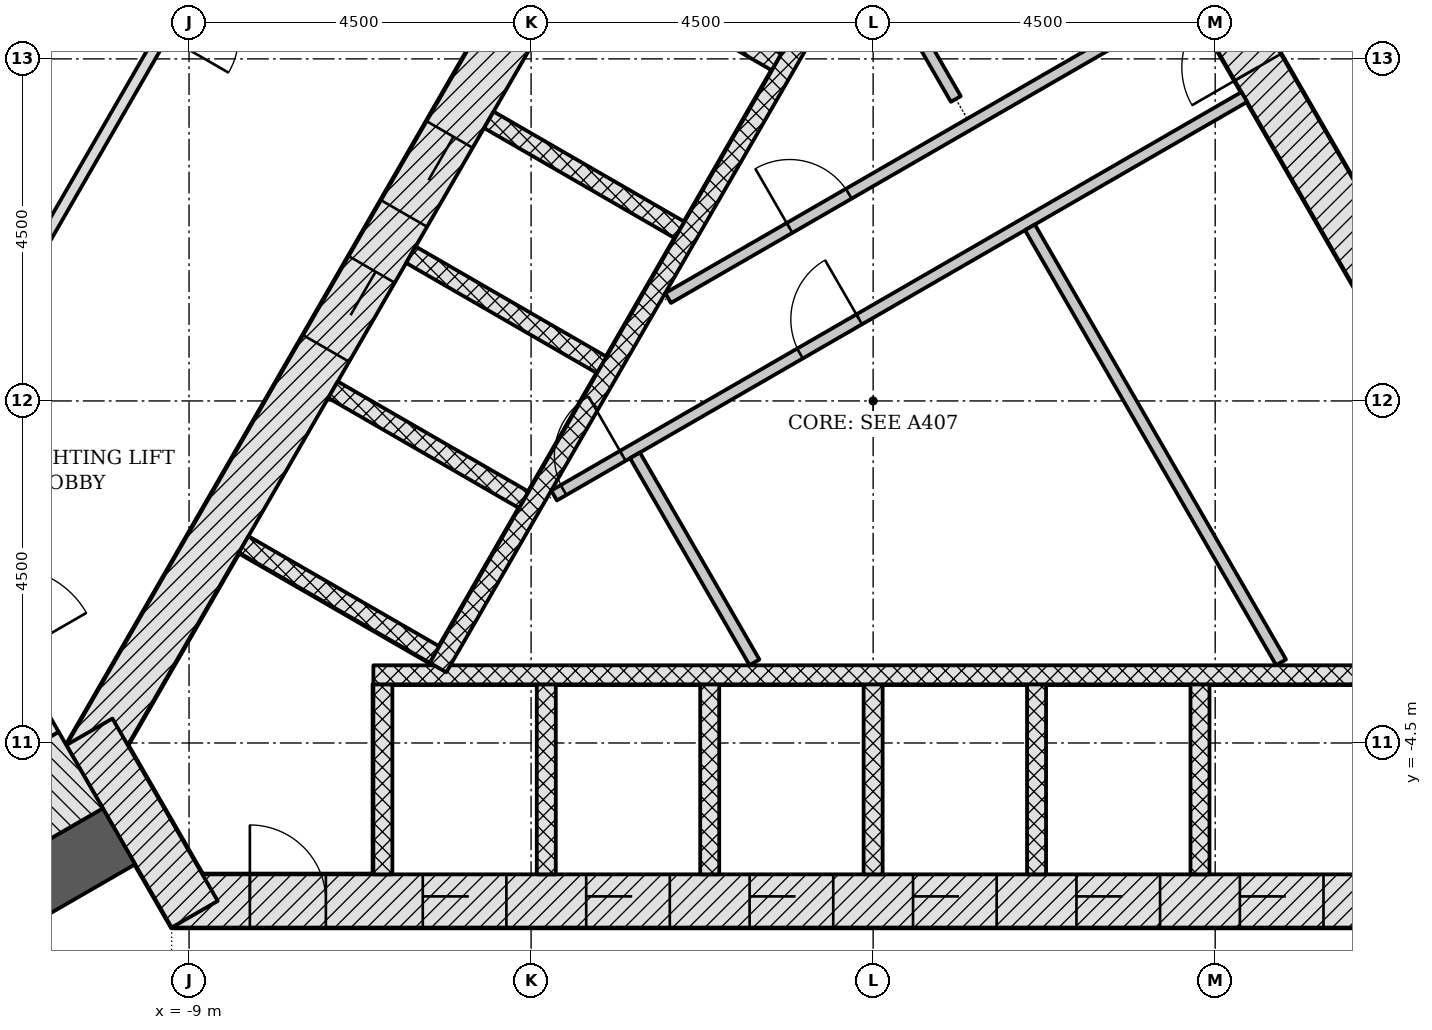
"""IFC4 building model, lengths in metres.
Left out: names, types, materials, properties, quantities, classifications, styles, units other than length and angle.
Written with IfcOpenShell. Run it as: python <this file> out.ifc"""

import sys

from ifc_helpers import new_model, si_unit, direction, frame, frame_2d, origin, place, context, subcontext, project, spatial, rectangle, extrude, element, fill, save


model = new_model("IFC4")
c1 = context("Model", 3, precision=1e-05, world=origin(), true_north=direction((0.0, 1.0)))
c2 = subcontext(c1, "Body", "Model", "MODEL_VIEW")
j1 = project(units=[si_unit("LENGTHUNIT", "METRE"), si_unit("PLANEANGLEUNIT", "RADIAN")], contexts=[c1])
p1 = place(None, origin())
s1 = spatial("IfcSite", under=j1, at=p1, CompositionType="ELEMENT")
p2 = place(p1, origin())
s2 = spatial("IfcBuilding", under=s1, at=p2, CompositionType="ELEMENT")
p3 = place(p2, frame((0.0, 0.0, 45.6)))
s3 = spatial("IfcBuildingStorey", under=s2, at=p3, CompositionType="ELEMENT", Elevation=45.6)
p4 = place(p3, frame((-9.229, -6.578, -0.2), z_axis=(0.0, 0.0, 1.0), x_axis=(1.0, 0.0, 0.0)))
e1 = element("IfcWall", 1, at=p4, inside=s3, PredefinedType="SHEAR", context=c2, shape_type="SweptSolid", body=[
    extrude(rectangle(XDim=18.458, YDim=0.7, at=frame_2d((9.229, 0.0))), origin(), (0.0, 0.0, 1.0), 3.6),
])
p5 = place(p4, frame((3.304, 0.0, 0.2)))
e2 = element("IfcOpeningElement", 2, at=p5, cuts=e1, PredefinedType="OPENING", context=c2, shape_type="SweptSolid", body=[
    extrude(rectangle(XDim=1.1, YDim=2.1, at=frame_2d((0.55, 1.05))), frame((0.0, 0.36, 0.0), z_axis=(0.0, -1.0, 0.0), x_axis=(1.0, 0.0, 0.0)), (0.0, 0.0, 1.0), 0.72),
])
p6 = place(p4, frame((5.454, 0.0, 0.2)))
e3 = element("IfcOpeningElement", 3, at=p6, cuts=e1, PredefinedType="OPENING", context=c2, shape_type="SweptSolid", body=[
    extrude(rectangle(XDim=1.1, YDim=2.1, at=frame_2d((0.55, 1.05))), frame((0.0, 0.36, 0.0), z_axis=(0.0, -1.0, 0.0), x_axis=(1.0, 0.0, 0.0)), (0.0, 0.0, 1.0), 0.72),
])
p7 = place(p4, frame((7.604, 0.0, 0.2)))
e4 = element("IfcOpeningElement", 4, at=p7, cuts=e1, PredefinedType="OPENING", context=c2, shape_type="SweptSolid", body=[
    extrude(rectangle(XDim=1.1, YDim=2.1, at=frame_2d((0.55, 1.05))), frame((0.0, 0.36, 0.0), z_axis=(0.0, -1.0, 0.0), x_axis=(1.0, 0.0, 0.0)), (0.0, 0.0, 1.0), 0.72),
])
p8 = place(p4, frame((9.754, 0.0, 0.2)))
e5 = element("IfcOpeningElement", 5, at=p8, cuts=e1, PredefinedType="OPENING", context=c2, shape_type="SweptSolid", body=[
    extrude(rectangle(XDim=1.1, YDim=2.1, at=frame_2d((0.55, 1.05))), frame((0.0, 0.36, 0.0), z_axis=(0.0, -1.0, 0.0), x_axis=(1.0, 0.0, 0.0)), (0.0, 0.0, 1.0), 0.72),
])
p9 = place(p4, frame((11.904, 0.0, 0.2)))
e6 = element("IfcOpeningElement", 6, at=p9, cuts=e1, PredefinedType="OPENING", context=c2, shape_type="SweptSolid", body=[
    extrude(rectangle(XDim=1.1, YDim=2.1, at=frame_2d((0.55, 1.05))), frame((0.0, 0.36, 0.0), z_axis=(0.0, -1.0, 0.0), x_axis=(1.0, 0.0, 0.0)), (0.0, 0.0, 1.0), 0.72),
])
p10 = place(p4, frame((14.054, 0.0, 0.2)))
e7 = element("IfcOpeningElement", 7, at=p10, cuts=e1, PredefinedType="OPENING", context=c2, shape_type="SweptSolid", body=[
    extrude(rectangle(XDim=1.1, YDim=2.1, at=frame_2d((0.55, 1.05))), frame((0.0, 0.36, 0.0), z_axis=(0.0, -1.0, 0.0), x_axis=(1.0, 0.0, 0.0)), (0.0, 0.0, 1.0), 0.72),
])
p11 = place(p4, frame((1.029, 0.0, 0.2)))
e8 = element("IfcOpeningElement", 8, at=p11, cuts=e1, PredefinedType="OPENING", context=c2, shape_type="SweptSolid", body=[
    extrude(rectangle(XDim=1.0, YDim=2.1, at=frame_2d((0.5, 1.05))), frame((0.0, 0.36, 0.0), z_axis=(0.0, -1.0, 0.0), x_axis=(1.0, 0.0, 0.0)), (0.0, 0.0, 1.0), 0.72),
])
p12 = place(p3, frame((10.311, -4.703, -0.2), z_axis=(0.0, 0.0, 1.0), x_axis=(-0.500001446645, 0.866024568562, 0.0)))
e9 = element("IfcWall", 9, at=p12, inside=s3, PredefinedType="SHEAR", context=c2, shape_type="SweptSolid", body=[
    extrude(rectangle(XDim=18.458, YDim=0.7, at=frame_2d((9.229, 0.0))), origin(), (0.0, 0.0, 1.0), 3.6),
])
p13 = place(p12, frame((10.5, 0.0, 0.2)))
e10 = element("IfcOpeningElement", 10, at=p13, cuts=e9, PredefinedType="OPENING", context=c2, shape_type="SweptSolid", body=[
    extrude(rectangle(XDim=1.0, YDim=2.1, at=frame_2d((0.5, 1.05))), frame((0.0, 0.36, 0.0), z_axis=(0.0, -1.0, 0.0), x_axis=(1.0, 0.0, 0.0)), (0.0, 0.0, 1.0), 0.72),
])
p14 = place(p12, frame((4.877, 0.0, 0.2)))
e11 = element("IfcOpeningElement", 11, at=p14, cuts=e9, PredefinedType="OPENING", context=c2, shape_type="SweptSolid", body=[
    extrude(rectangle(XDim=0.9, YDim=2.1, at=frame_2d((0.45, 1.05))), frame((0.0, 0.36, 0.0), z_axis=(0.0, -1.0, 0.0), x_axis=(1.0, 0.0, 0.0)), (0.0, 0.0, 1.0), 0.72),
])
p15 = place(p12, frame((14.452, 0.0, 0.2)))
e12 = element("IfcOpeningElement", 12, at=p15, cuts=e9, PredefinedType="OPENING", context=c2, shape_type="SweptSolid", body=[
    extrude(rectangle(XDim=0.9, YDim=2.1, at=frame_2d((0.45, 1.05))), frame((0.0, 0.36, 0.0), z_axis=(0.0, -1.0, 0.0), x_axis=(1.0, 0.0, 0.0)), (0.0, 0.0, 1.0), 0.72),
])
p16 = place(p3, frame((-1.083, 11.281, -0.2), z_axis=(0.0, 0.0, 1.0), x_axis=(-0.500001446645, -0.866024568562, 0.0)))
e13 = element("IfcWall", 13, at=p16, inside=s3, PredefinedType="SHEAR", context=c2, shape_type="SweptSolid", body=[
    extrude(rectangle(XDim=18.458, YDim=0.7, at=frame_2d((9.229, 0.0))), origin(), (0.0, 0.0, 1.0), 3.6),
])
p17 = place(p16, frame((8.979, 0.0, 0.2)))
e14 = element("IfcOpeningElement", 14, at=p17, cuts=e13, PredefinedType="OPENING", context=c2, shape_type="SweptSolid", body=[
    extrude(rectangle(XDim=1.2, YDim=2.1, at=frame_2d((0.6, 1.05))), frame((0.0, 0.36, 0.0), z_axis=(0.0, -1.0, 0.0), x_axis=(1.0, 0.0, 0.0)), (0.0, 0.0, 1.0), 0.72),
])
p18 = place(p16, frame((11.029, 0.0, 0.2)))
e15 = element("IfcOpeningElement", 15, at=p18, cuts=e13, PredefinedType="OPENING", context=c2, shape_type="SweptSolid", body=[
    extrude(rectangle(XDim=1.2, YDim=2.1, at=frame_2d((0.6, 1.05))), frame((0.0, 0.36, 0.0), z_axis=(0.0, -1.0, 0.0), x_axis=(1.0, 0.0, 0.0)), (0.0, 0.0, 1.0), 0.72),
])
p19 = place(p3, frame((-10.311, -4.353, -0.2), z_axis=(0.0, 0.0, 1.0), x_axis=(0.500042739161, -0.866000726912, 0.0)))
e16 = element("IfcWall", 16, at=p19, inside=s3, PredefinedType="SHEAR", context=c2, shape_type="SweptSolid", body=[
    extrude(rectangle(XDim=2.771, YDim=0.7, at=frame_2d((1.386, 0.0))), origin(), (0.0, 0.0, 1.0), 3.6),
])
p20 = place(p3, frame((-9.922, -5.728, -0.2), z_axis=(0.0, 0.0, 1.0), x_axis=(-0.866021666006, -0.500006473966, 0.0)))
e17 = element("IfcWall", 17, at=p20, inside=s3, PredefinedType="SHEAR", context=c2, shape_type="SweptSolid", body=[
    extrude(rectangle(XDim=14.013, YDim=0.85, at=frame_2d((7.007, 0.0))), origin(), (0.0, 0.0, 1.0), 3.6),
])
for number, where, z_axis, x_axis in (
    (18, (-6.45, -6.228, -0.2), (0.0, 0.0, 1.0), (0.0, 1.0, 0.0)),
    (19, (-4.3, -6.228, -0.2), (0.0, 0.0, 1.0), (0.0, 1.0, 0.0)),
    (20, (-2.15, -6.228, -0.2), (0.0, 0.0, 1.0), (0.0, 1.0, 0.0)),
    (21, (0.0, -6.228, -0.2), (0.0, 0.0, 1.0), (0.0, 1.0, 0.0)),
    (22, (2.15, -6.228, -0.2), (0.0, 0.0, 1.0), (0.0, 1.0, 0.0)),
    (23, (4.3, -6.228, -0.2), (0.0, 0.0, 1.0), (0.0, 1.0, 0.0)),
):
    element("IfcWall", number, at=place(p3, frame(where, z_axis=z_axis, x_axis=x_axis)), inside=s3, PredefinedType="PARTITIONING", context=c2, shape_type="SweptSolid", body=[
        extrude(rectangle(XDim=2.5, YDim=0.25, at=frame_2d((1.25, 0.0))), origin(), (0.0, 0.0, 1.0), 3.6),
    ])
p21 = place(p3, frame((-6.575, -3.603, 0.0), z_axis=(0.0, 0.0, 1.0), x_axis=(1.0, 0.0, 0.0)))
e24 = element("IfcWall", 24, at=p21, inside=s3, PredefinedType="PARTITIONING", context=c2, shape_type="SweptSolid", body=[
    extrude(rectangle(XDim=13.15, YDim=0.25, at=frame_2d((6.575, 0.0))), origin(), (0.0, 0.0, 1.0), 3.4),
])
for number, where, z_axis, x_axis in (
    (25, (-3.781, 5.907, -0.2), (0.0, 0.0, 1.0), (0.866, -0.5, 0.0)),
    (26, (-5.056, 3.699, -0.2), (0.0, 0.0, 1.0), (0.866, -0.5, 0.0)),
    (27, (-6.081, 1.923, -0.2), (0.0, 0.0, 1.0), (0.866, -0.5, 0.0)),
    (28, (-7.106, 0.148, -0.2), (0.0, 0.0, 1.0), (0.866, -0.5, 0.0)),
    (29, (-8.281, -1.887, -0.2), (0.0, 0.0, 1.0), (0.866, -0.5, 0.0)),
):
    element("IfcWall", number, at=place(p3, frame(where, z_axis=z_axis, x_axis=x_axis)), inside=s3, PredefinedType="PARTITIONING", context=c2, shape_type="SweptSolid", body=[
        extrude(rectangle(XDim=2.9, YDim=0.25, at=frame_2d((1.45, 0.0))), origin(), (0.0, 0.0, 1.0), 3.6),
    ])
p22 = place(p3, frame((0.176, 6.711, 0.0), z_axis=(0.0, 0.0, 1.0), x_axis=(-0.500004227369, -0.866022963098, 0.0)))
e30 = element("IfcWall", 30, at=p22, inside=s3, PredefinedType="PARTITIONING", context=c2, shape_type="SweptSolid", body=[
    extrude(rectangle(XDim=11.8, YDim=0.25, at=frame_2d((5.9, 0.0))), origin(), (0.0, 0.0, 1.0), 3.4),
])
p23 = place(p3, frame((-4.198, -1.244, 0.0), z_axis=(0.0, 0.0, 1.0), x_axis=(0.866020798945, 0.500007975732, 0.0)))
e31 = element("IfcWall", 31, at=p23, inside=s3, PredefinedType="PARTITIONING", context=c2, shape_type="SweptSolid", body=[
    extrude(rectangle(XDim=10.486, YDim=0.15, at=frame_2d((5.243, 0.0))), origin(), (0.0, 0.0, 1.0), 3.4),
])
p24 = place(p23, frame((3.736, 0.0, 0.0)))
e32 = element("IfcOpeningElement", 32, at=p24, cuts=e31, PredefinedType="OPENING", context=c2, shape_type="SweptSolid", body=[
    extrude(rectangle(XDim=0.9, YDim=2.1, at=frame_2d((0.45, 1.05))), frame((0.0, 0.085, 0.0), z_axis=(0.0, -1.0, 0.0), x_axis=(1.0, 0.0, 0.0)), (0.0, 0.0, 1.0), 0.17),
])
p25 = place(p23, frame((0.144, 0.0, 0.0)))
e33 = element("IfcOpeningElement", 33, at=p25, cuts=e31, PredefinedType="OPENING", context=c2, shape_type="SweptSolid", body=[
    extrude(rectangle(XDim=0.9, YDim=2.1, at=frame_2d((0.45, 1.05))), frame((0.0, 0.085, 0.0), z_axis=(0.0, -1.0, 0.0), x_axis=(1.0, 0.0, 0.0)), (0.0, 0.0, 1.0), 0.17),
])
p26 = place(p3, frame((5.367, -3.439, 0.0), z_axis=(0.0, 0.0, 1.0), x_axis=(-0.499981499682, 0.866036084685, 0.0)))
e34 = element("IfcWall", 34, at=p26, inside=s3, PredefinedType="PARTITIONING", context=c2, shape_type="SweptSolid", body=[
    extrude(rectangle(XDim=6.608, YDim=0.15, at=frame_2d((3.304, 0.0))), origin(), (0.0, 0.0, 1.0), 3.4),
])
p27 = place(p3, frame((-1.561, -3.439, 0.0), z_axis=(0.0, 0.0, 1.0), x_axis=(-0.499989077369, 0.866031709877, 0.0)))
e35 = element("IfcWall", 35, at=p27, inside=s3, PredefinedType="PARTITIONING", context=c2, shape_type="SweptSolid", body=[
    extrude(rectangle(XDim=3.144, YDim=0.15, at=frame_2d((1.572, 0.0))), origin(), (0.0, 0.0, 1.0), 3.4),
])
p28 = place(p3, frame((-2.698, 1.354, 0.0), z_axis=(0.0, 0.0, 1.0), x_axis=(0.866021157486, 0.500007354732, 0.0)))
e36 = element("IfcWall", 36, at=p28, inside=s3, PredefinedType="PARTITIONING", context=c2, shape_type="SweptSolid", body=[
    extrude(rectangle(XDim=7.888, YDim=0.15, at=frame_2d((3.944, 0.0))), origin(), (0.0, 0.0, 1.0), 3.4),
])
p29 = place(p28, frame((1.845, 0.0, 0.0)))
e37 = element("IfcOpeningElement", 37, at=p29, cuts=e36, PredefinedType="OPENING", context=c2, shape_type="SweptSolid", body=[
    extrude(rectangle(XDim=0.9, YDim=2.1, at=frame_2d((0.45, 1.05))), frame((0.0, 0.085, 0.0), z_axis=(0.0, -1.0, 0.0), x_axis=(1.0, 0.0, 0.0)), (0.0, 0.0, 1.0), 0.17),
])
p30 = place(p3, frame((1.088, 3.972, 0.0), z_axis=(0.0, 0.0, 1.0), x_axis=(-0.500116913307, 0.865957893332, 0.0)))
e38 = element("IfcWall", 38, at=p30, inside=s3, PredefinedType="PARTITIONING", context=c2, shape_type="SweptSolid", body=[
    extrude(rectangle(XDim=2.304, YDim=0.15, at=frame_2d((1.152, 0.0))), origin(), (0.0, 0.0, 1.0), 3.4),
])
p31 = place(p3, frame((-12.576, -1.331, -0.2), z_axis=(0.0, 0.0, 1.0), x_axis=(0.499970499736, -0.8660424351, 0.0)))
e39 = element("IfcWall", 39, at=p31, inside=s3, PredefinedType="SHEAR", context=c2, shape_type="SweptSolid", body=[
    extrude(rectangle(XDim=3.55, YDim=0.2, at=frame_2d((1.775, 0.0))), origin(), (0.0, 0.0, 1.0), 3.6),
])
p32 = place(p31, frame((1.175, 0.0, 0.2)))
e40 = element("IfcOpeningElement", 40, at=p32, cuts=e39, PredefinedType="OPENING", context=c2, shape_type="SweptSolid", body=[
    extrude(rectangle(XDim=1.2, YDim=2.1, at=frame_2d((0.6, 1.05))), frame((0.0, 0.11, 0.0), z_axis=(0.0, -1.0, 0.0), x_axis=(1.0, 0.0, 0.0)), (0.0, 0.0, 1.0), 0.22),
])
p33 = place(p3, frame((-10.424, -4.858, -0.2), z_axis=(0.0, 0.0, 1.0), x_axis=(-0.866033125095, -0.499986626058, 0.0)))
e41 = element("IfcWall", 41, at=p33, inside=s3, PredefinedType="SHEAR", context=c2, shape_type="SweptSolid", body=[
    extrude(rectangle(XDim=7.2, YDim=1.161, at=frame_2d((3.6, 0.0))), origin(), (0.0, 0.0, 1.0), 3.6),
])
p34 = place(p3, frame((-16.256, -3.149, 0.0), z_axis=(0.0, 0.0, 1.0), x_axis=(0.499999683919, 0.866025586274, 0.0)))
e42 = element("IfcWall", 42, at=p34, inside=s3, PredefinedType="PARTITIONING", context=c2, shape_type="SweptSolid", body=[
    extrude(rectangle(XDim=22.234, YDim=0.15, at=frame_2d((11.117, 0.0))), origin(), (0.0, 0.0, 1.0), 2.778),
])
p35 = place(p34, frame((17.842, 0.0, 0.0)))
e43 = element("IfcOpeningElement", 43, at=p35, cuts=e42, PredefinedType="OPENING", context=c2, shape_type="SweptSolid", body=[
    extrude(rectangle(XDim=1.0, YDim=2.1, at=frame_2d((0.5, 1.05))), frame((0.0, 0.085, 0.0), z_axis=(0.0, -1.0, 0.0), x_axis=(1.0, 0.0, 0.0)), (0.0, 0.0, 1.0), 0.17),
])
p36 = place(p34, frame((15.26, 0.0, 0.0)))
e44 = element("IfcOpeningElement", 44, at=p36, cuts=e42, PredefinedType="OPENING", context=c2, shape_type="SweptSolid", body=[
    extrude(rectangle(XDim=1.0, YDim=2.1, at=frame_2d((0.5, 1.05))), frame((0.0, 0.085, 0.0), z_axis=(0.0, -1.0, 0.0), x_axis=(1.0, 0.0, 0.0)), (0.0, 0.0, 1.0), 0.17),
])
p37 = place(p34, frame((11.92, 0.0, 0.0)))
e45 = element("IfcOpeningElement", 45, at=p37, cuts=e42, PredefinedType="OPENING", context=c2, shape_type="SweptSolid", body=[
    extrude(rectangle(XDim=1.5, YDim=2.1, at=frame_2d((0.75, 1.05))), frame((0.0, 0.085, 0.0), z_axis=(0.0, -1.0, 0.0), x_axis=(1.0, 0.0, 0.0)), (0.0, 0.0, 1.0), 0.17),
])
p38 = place(p34, frame((4.547, 0.0, 0.0)))
e46 = element("IfcOpeningElement", 46, at=p38, cuts=e42, PredefinedType="OPENING", context=c2, shape_type="SweptSolid", body=[
    extrude(rectangle(XDim=1.5, YDim=2.1, at=frame_2d((0.75, 1.05))), frame((0.0, 0.085, 0.0), z_axis=(0.0, -1.0, 0.0), x_axis=(1.0, 0.0, 0.0)), (0.0, 0.0, 1.0), 0.17),
])
p39 = place(p3, frame((-4.407, 13.374, 0.0), z_axis=(0.0, 0.0, 1.0), x_axis=(-0.499997181693, -0.866027030928, 0.0)))
e47 = element("IfcWall", 47, at=p39, inside=s3, PredefinedType="PARTITIONING", context=c2, shape_type="SweptSolid", body=[
    extrude(rectangle(XDim=16.77, YDim=0.15, at=frame_2d((8.385, 0.0))), origin(), (0.0, 0.0, 1.0), 2.778),
])
p40 = place(p39, frame((8.879, 0.0, 0.0)))
e48 = element("IfcOpeningElement", 48, at=p40, cuts=e47, PredefinedType="OPENING", context=c2, shape_type="SweptSolid", body=[
    extrude(rectangle(XDim=1.0, YDim=2.1, at=frame_2d((0.5, 1.05))), frame((0.0, 0.085, 0.0), z_axis=(0.0, -1.0, 0.0), x_axis=(1.0, 0.0, 0.0)), (0.0, 0.0, 1.0), 0.17),
])
p41 = place(p3, frame((5.346, 8.446, 0.0), z_axis=(0.0, 0.0, 1.0), x_axis=(0.500008781656, -0.866020333634, 0.0)))
e49 = element("IfcWall", 49, at=p41, inside=s3, PredefinedType="PARTITIONING", context=c2, shape_type="SweptSolid", body=[
    extrude(rectangle(XDim=15.057, YDim=0.15, at=frame_2d((7.528, 0.0))), origin(), (0.0, 0.0, 1.0), 2.778),
])
p42 = place(p41, frame((9.446, 0.0, 0.0)))
e50 = element("IfcOpeningElement", 50, at=p42, cuts=e49, PredefinedType="OPENING", context=c2, shape_type="SweptSolid", body=[
    extrude(rectangle(XDim=1.0, YDim=2.1, at=frame_2d((0.5, 1.05))), frame((0.0, 0.085, 0.0), z_axis=(0.0, -1.0, 0.0), x_axis=(1.0, 0.0, 0.0)), (0.0, 0.0, 1.0), 0.17),
])
p43 = place(p41, frame((1.892, 0.0, 0.0)))
e51 = element("IfcOpeningElement", 51, at=p43, cuts=e49, PredefinedType="OPENING", context=c2, shape_type="SweptSolid", body=[
    extrude(rectangle(XDim=1.0, YDim=2.1, at=frame_2d((0.5, 1.05))), frame((0.0, 0.085, 0.0), z_axis=(0.0, -1.0, 0.0), x_axis=(1.0, 0.0, 0.0)), (0.0, 0.0, 1.0), 0.17),
])
p44 = place(p3, frame((-11.376, -7.059, 0.0), z_axis=(0.0, 0.0, 1.0), x_axis=(0.500076779081, -0.865981070823, 0.0)))
e52 = element("IfcWall", 52, at=p44, inside=s3, PredefinedType="PARTITIONING", context=c2, shape_type="SweptSolid", body=[
    extrude(rectangle(XDim=2.147, YDim=0.15, at=frame_2d((1.074, 0.0))), origin(), (0.0, 0.0, 1.0), 3.4),
])
p45 = place(p5, origin())
e53 = element("IfcDoor", 53, at=p45, inside=s3, OperationType="DOUBLE_DOOR_SLIDING", PredefinedType="DOOR", context=c2, shape_type="SweptSolid", body=[
    extrude(rectangle(XDim=1.1, YDim=2.1, at=frame_2d((0.55, 1.05))), frame((0.0, 0.025, 0.0), z_axis=(0.0, -1.0, 0.0), x_axis=(1.0, 0.0, 0.0)), (0.0, 0.0, 1.0), 0.05),
])
fill(e2, e53)
p46 = place(p6, origin())
e54 = element("IfcDoor", 54, at=p46, inside=s3, OperationType="DOUBLE_DOOR_SLIDING", PredefinedType="DOOR", context=c2, shape_type="SweptSolid", body=[
    extrude(rectangle(XDim=1.1, YDim=2.1, at=frame_2d((0.55, 1.05))), frame((0.0, 0.025, 0.0), z_axis=(0.0, -1.0, 0.0), x_axis=(1.0, 0.0, 0.0)), (0.0, 0.0, 1.0), 0.05),
])
fill(e3, e54)
p47 = place(p7, origin())
e55 = element("IfcDoor", 55, at=p47, inside=s3, OperationType="DOUBLE_DOOR_SLIDING", PredefinedType="DOOR", context=c2, shape_type="SweptSolid", body=[
    extrude(rectangle(XDim=1.1, YDim=2.1, at=frame_2d((0.55, 1.05))), frame((0.0, 0.025, 0.0), z_axis=(0.0, -1.0, 0.0), x_axis=(1.0, 0.0, 0.0)), (0.0, 0.0, 1.0), 0.05),
])
fill(e4, e55)
p48 = place(p8, origin())
e56 = element("IfcDoor", 56, at=p48, inside=s3, OperationType="DOUBLE_DOOR_SLIDING", PredefinedType="DOOR", context=c2, shape_type="SweptSolid", body=[
    extrude(rectangle(XDim=1.1, YDim=2.1, at=frame_2d((0.55, 1.05))), frame((0.0, 0.025, 0.0), z_axis=(0.0, -1.0, 0.0), x_axis=(1.0, 0.0, 0.0)), (0.0, 0.0, 1.0), 0.05),
])
fill(e5, e56)
p49 = place(p9, origin())
e57 = element("IfcDoor", 57, at=p49, inside=s3, OperationType="DOUBLE_DOOR_SLIDING", PredefinedType="DOOR", context=c2, shape_type="SweptSolid", body=[
    extrude(rectangle(XDim=1.1, YDim=2.1, at=frame_2d((0.55, 1.05))), frame((0.0, 0.025, 0.0), z_axis=(0.0, -1.0, 0.0), x_axis=(1.0, 0.0, 0.0)), (0.0, 0.0, 1.0), 0.05),
])
fill(e6, e57)
p50 = place(p10, origin())
e58 = element("IfcDoor", 58, at=p50, inside=s3, OperationType="DOUBLE_DOOR_SLIDING", PredefinedType="DOOR", context=c2, shape_type="SweptSolid", body=[
    extrude(rectangle(XDim=1.1, YDim=2.1, at=frame_2d((0.55, 1.05))), frame((0.0, 0.025, 0.0), z_axis=(0.0, -1.0, 0.0), x_axis=(1.0, 0.0, 0.0)), (0.0, 0.0, 1.0), 0.05),
])
fill(e7, e58)
p51 = place(p17, origin())
e59 = element("IfcDoor", 59, at=p51, inside=s3, OperationType="DOUBLE_DOOR_SLIDING", PredefinedType="DOOR", context=c2, shape_type="SweptSolid", body=[
    extrude(rectangle(XDim=1.2, YDim=2.1, at=frame_2d((0.6, 1.05))), frame((0.0, 0.025, 0.0), z_axis=(0.0, -1.0, 0.0), x_axis=(1.0, 0.0, 0.0)), (0.0, 0.0, 1.0), 0.05),
])
fill(e14, e59)
p52 = place(p18, origin())
e60 = element("IfcDoor", 60, at=p52, inside=s3, OperationType="DOUBLE_DOOR_SLIDING", PredefinedType="DOOR", context=c2, shape_type="SweptSolid", body=[
    extrude(rectangle(XDim=1.2, YDim=2.1, at=frame_2d((0.6, 1.05))), frame((0.0, 0.025, 0.0), z_axis=(0.0, -1.0, 0.0), x_axis=(1.0, 0.0, 0.0)), (0.0, 0.0, 1.0), 0.05),
])
fill(e15, e60)
p53 = place(p13, origin())
e61 = element("IfcDoor", 61, at=p53, inside=s3, OperationType="SINGLE_SWING_LEFT", PredefinedType="DOOR", context=c2, shape_type="SweptSolid", body=[
    extrude(rectangle(XDim=1.0, YDim=2.1, at=frame_2d((0.5, 1.05))), frame((0.0, 0.075, 0.0), z_axis=(0.0, -1.0, 0.0), x_axis=(1.0, 0.0, 0.0)), (0.0, 0.0, 1.0), 0.15),
])
fill(e10, e61)
p54 = place(p24, origin())
e62 = element("IfcDoor", 62, at=p54, inside=s3, OperationType="SINGLE_SWING_RIGHT", PredefinedType="DOOR", context=c2, shape_type="SweptSolid", body=[
    extrude(rectangle(XDim=0.9, YDim=2.1, at=frame_2d((0.45, 1.05))), frame((0.0, 0.025, 0.0), z_axis=(0.0, -1.0, 0.0), x_axis=(1.0, 0.0, 0.0)), (0.0, 0.0, 1.0), 0.05),
])
fill(e32, e62)
p55 = place(p29, origin())
e63 = element("IfcDoor", 63, at=p55, inside=s3, OperationType="SINGLE_SWING_LEFT", PredefinedType="DOOR", context=c2, shape_type="SweptSolid", body=[
    extrude(rectangle(XDim=0.9, YDim=2.1, at=frame_2d((0.45, 1.05))), frame((0.0, 0.025, 0.0), z_axis=(0.0, -1.0, 0.0), x_axis=(1.0, 0.0, 0.0)), (0.0, 0.0, 1.0), 0.05),
])
fill(e37, e63)
p56 = place(p25, origin())
e64 = element("IfcDoor", 64, at=p56, inside=s3, OperationType="SINGLE_SWING_RIGHT", PredefinedType="DOOR", context=c2, shape_type="SweptSolid", body=[
    extrude(rectangle(XDim=0.9, YDim=2.1, at=frame_2d((0.45, 1.05))), frame((0.0, 0.025, 0.0), z_axis=(0.0, -1.0, 0.0), x_axis=(1.0, 0.0, 0.0)), (0.0, 0.0, 1.0), 0.05),
])
fill(e33, e64)
p57 = place(p11, origin())
e65 = element("IfcDoor", 65, at=p57, inside=s3, OperationType="SINGLE_SWING_LEFT", PredefinedType="DOOR", context=c2, shape_type="SweptSolid", body=[
    extrude(rectangle(XDim=1.0, YDim=2.1, at=frame_2d((0.5, 1.05))), frame((0.0, 0.075, 0.0), z_axis=(0.0, -1.0, 0.0), x_axis=(1.0, 0.0, 0.0)), (0.0, 0.0, 1.0), 0.15),
])
fill(e8, e65)
save(model, sys.argv[1])
